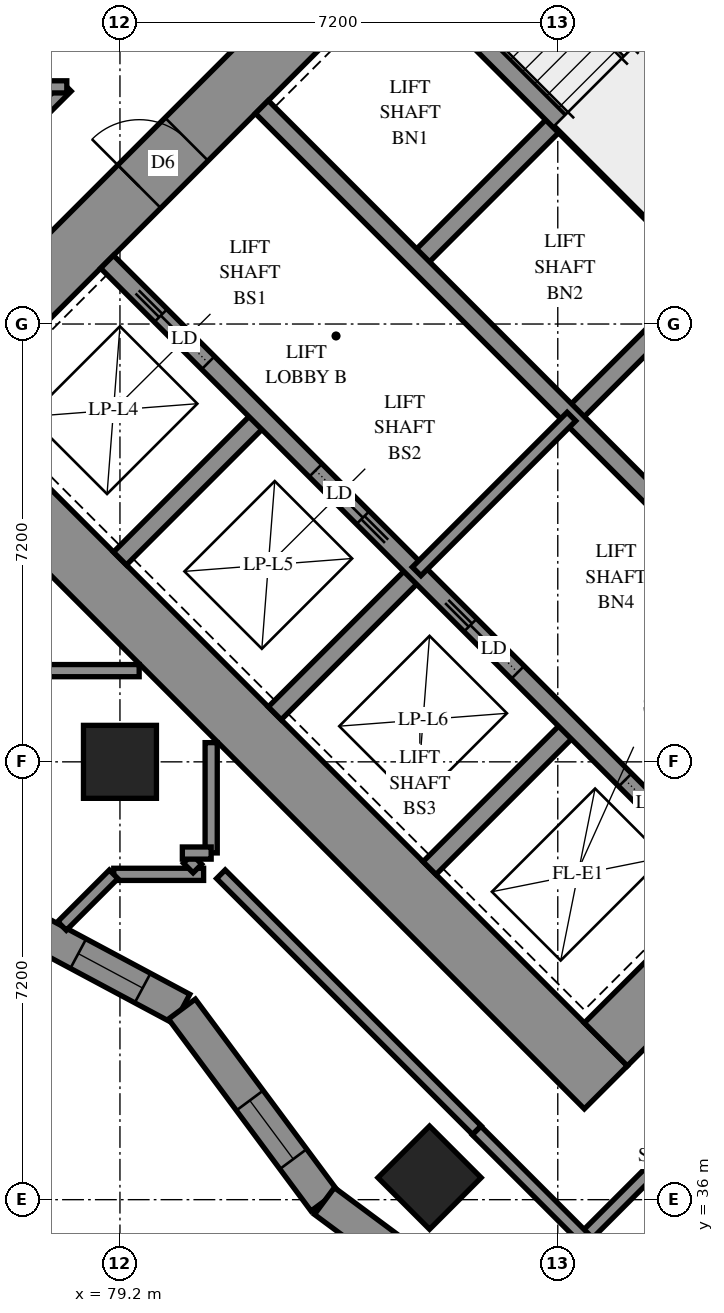
"""IFC4 building model, lengths in metres.
Left out: names, types, materials, properties, quantities, classifications, styles, units other than length and angle.
Written with IfcOpenShell. Run it as: python <this file> out.ifc"""

import sys

from ifc_helpers import new_model, si_unit, direction, frame, frame_2d, origin, origin_2d, place, context, subcontext, project, spatial, polyline, rectangle, outline, extrude, element, fill, save


model = new_model("IFC4")
c1 = context("Model", 3, precision=1e-05, world=origin(), true_north=direction((0.0, 1.0)))
c2 = subcontext(c1, "Body", "Model", "MODEL_VIEW")
j1 = project(units=[si_unit("LENGTHUNIT", "METRE"), si_unit("PLANEANGLEUNIT", "RADIAN")], contexts=[c1])
p1 = place(None, origin())
s1 = spatial("IfcSite", under=j1, at=p1, CompositionType="ELEMENT")
p2 = place(p1, origin())
s2 = spatial("IfcBuilding", under=s1, at=p2, CompositionType="ELEMENT")
p3 = place(p2, frame((0.0, 0.0, 57.6)))
s3 = spatial("IfcBuildingStorey", under=s2, at=p3, CompositionType="ELEMENT", Elevation=57.6)
for number, where, z_axis, x_axis in (
    (1, (79.2, 43.2, 0.0), (0.0, 0.0, 1.0), (1.0, 0.0, 0.0)),
    (2, (84.291, 36.362, 0.0), (0.0, 0.0, 1.0), (0.707, -0.707, 0.0)),
):
    element("IfcColumn", number, at=place(p3, frame(where, z_axis=z_axis, x_axis=x_axis)), inside=s3, PredefinedType="COLUMN", context=c2, shape_type="SweptSolid", body=[
        extrude(rectangle(XDim=1.2, YDim=1.2, at=origin_2d()), origin(), (0.0, 0.0, 1.0), 3.1),
    ])
p4 = place(p3, frame((75.594, 49.443, -0.3), z_axis=(0.0, 0.0, 1.0), x_axis=(0.7071037324, -0.70710983, 0.0)))
e3 = element("IfcWall", 3, at=p4, inside=s3, PredefinedType="SHEAR", context=c2, shape_type="SweptSolid", body=[
    extrude(rectangle(XDim=16.4, YDim=1.0, at=frame_2d((8.2, 0.0))), origin(), (0.0, 0.0, 1.0), 2.7),
])
p5 = place(p3, frame((86.483, 60.333, -0.3), z_axis=(0.0, 0.0, 1.0), x_axis=(0.70710983, -0.7071037324, 0.0)))
e4 = element("IfcWall", 4, at=p5, inside=s3, PredefinedType="SHEAR", context=c2, shape_type="SweptSolid", body=[
    extrude(rectangle(XDim=16.4, YDim=1.0, at=frame_2d((8.2, 0.0))), origin(), (0.0, 0.0, 1.0), 2.7),
])
p6 = place(p5, frame((11.0, 0.0, 0.3)))
e5 = element("IfcOpeningElement", 5, at=p6, cuts=e4, PredefinedType="OPENING", context=c2, shape_type="SweptSolid", body=[
    extrude(rectangle(XDim=0.8, YDim=2.1, at=frame_2d((0.4, 1.05))), frame((0.0, 0.51, 0.0), z_axis=(0.0, -1.0, 0.0), x_axis=(1.0, 0.0, 0.0)), (0.0, 0.0, 1.0), 1.02),
])
p7 = place(p3, frame((76.301, 49.443, -0.3), z_axis=(0.0, 0.0, 1.0), x_axis=(0.7071067812, 0.7071067812, 0.0)))
e6 = element("IfcWall", 6, at=p7, inside=s3, PredefinedType="SHEAR", context=c2, shape_type="SweptSolid", body=[
    extrude(rectangle(XDim=14.4, YDim=1.0, at=frame_2d((7.2, 0.0))), origin(), (0.0, 0.0, 1.0), 2.7),
])
p8 = place(p7, frame((4.55, 0.0, 0.3)))
e7 = element("IfcOpeningElement", 7, at=p8, cuts=e6, PredefinedType="OPENING", context=c2, shape_type="SweptSolid", body=[
    extrude(rectangle(XDim=1.1, YDim=2.1, at=frame_2d((0.55, 1.05))), frame((0.0, 0.51, 0.0), z_axis=(0.0, -1.0, 0.0), x_axis=(1.0, 0.0, 0.0)), (0.0, 0.0, 1.0), 1.02),
])
p9 = place(p7, frame((11.35, 0.0, 0.3)))
e8 = element("IfcOpeningElement", 8, at=p9, cuts=e6, PredefinedType="OPENING", context=c2, shape_type="SweptSolid", body=[
    extrude(rectangle(XDim=1.1, YDim=2.1, at=frame_2d((0.55, 1.05))), frame((0.0, 0.51, 0.0), z_axis=(0.0, -1.0, 0.0), x_axis=(1.0, 0.0, 0.0)), (0.0, 0.0, 1.0), 1.02),
])
p10 = place(p3, frame((87.19, 38.554, -0.3), z_axis=(0.0, 0.0, 1.0), x_axis=(0.707103309, 0.7071102534, 0.0)))
e9 = element("IfcWall", 9, at=p10, inside=s3, PredefinedType="SHEAR", context=c2, shape_type="SweptSolid", body=[
    extrude(rectangle(XDim=14.4, YDim=1.0, at=frame_2d((7.2, 0.0))), origin(), (0.0, 0.0, 1.0), 2.7),
])
p11 = place(p10, frame((4.55, 0.0, 0.3)))
e10 = element("IfcOpeningElement", 10, at=p11, cuts=e9, PredefinedType="OPENING", context=c2, shape_type="SweptSolid", body=[
    extrude(rectangle(XDim=1.1, YDim=2.1, at=frame_2d((0.55, 1.05))), frame((0.0, 0.51, 0.0), z_axis=(0.0, -1.0, 0.0), x_axis=(1.0, 0.0, 0.0)), (0.0, 0.0, 1.0), 1.02),
])
p12 = place(p10, frame((11.35, 0.0, 0.3)))
e11 = element("IfcOpeningElement", 11, at=p12, cuts=e9, PredefinedType="OPENING", context=c2, shape_type="SweptSolid", body=[
    extrude(rectangle(XDim=1.1, YDim=2.1, at=frame_2d((0.55, 1.05))), frame((0.0, 0.51, 0.0), z_axis=(0.0, -1.0, 0.0), x_axis=(1.0, 0.0, 0.0)), (0.0, 0.0, 1.0), 1.02),
])
for number, where, z_axis, x_axis in (
    (12, (79.2, 46.544, 0.0), (0.0, 0.0, 1.0), (0.707, 0.707, 0.0)),
    (13, (84.079, 51.423, 0.0), (0.0, 0.0, 1.0), (0.707, 0.707, 0.0)),
):
    element("IfcWall", number, at=place(p3, frame(where, z_axis=z_axis, x_axis=x_axis)), inside=s3, PredefinedType="SOLIDWALL", context=c2, shape_type="SweptSolid", body=[
        extrude(rectangle(XDim=3.3, YDim=0.3, at=frame_2d((1.65, 0.0))), origin(), (0.0, 0.0, 1.0), 3.1),
    ])
p13 = place(p3, frame((81.746, 43.999, 0.0), z_axis=(0.0, 0.0, 1.0), x_axis=(0.7071067812, 0.7071067812, 0.0)))
e14 = element("IfcWall", 14, at=p13, inside=s3, PredefinedType="SOLIDWALL", context=c2, shape_type="SweptSolid", body=[
    extrude(rectangle(XDim=3.3, YDim=0.3, at=frame_2d((1.65, 0.0))), origin(), (0.0, 0.0, 1.0), 3.1),
])
p14 = place(p3, frame((86.625, 48.878, 0.0), z_axis=(0.0, 0.0, 1.0), x_axis=(0.7071067812, 0.7071067812, 0.0)))
e15 = element("IfcWall", 15, at=p14, inside=s3, PredefinedType="SOLIDWALL", context=c2, shape_type="SweptSolid", body=[
    extrude(rectangle(XDim=3.3, YDim=0.3, at=frame_2d((1.65, 0.0))), origin(), (0.0, 0.0, 1.0), 3.1),
])
p15 = place(p3, frame((84.291, 41.453, 0.0), z_axis=(0.0, 0.0, 1.0), x_axis=(0.7071067812, 0.7071067812, 0.0)))
e16 = element("IfcWall", 16, at=p15, inside=s3, PredefinedType="SOLIDWALL", context=c2, shape_type="SweptSolid", body=[
    extrude(rectangle(XDim=3.3, YDim=0.3, at=frame_2d((1.65, 0.0))), origin(), (0.0, 0.0, 1.0), 3.1),
])
p16 = place(p3, frame((78.988, 51.423, 0.0), z_axis=(0.0, 0.0, 1.0), x_axis=(0.7071067812, -0.7071067812, 0.0)))
e17 = element("IfcWall", 17, at=p16, inside=s3, PredefinedType="SOLIDWALL", context=c2, shape_type="SweptSolid", body=[
    extrude(rectangle(XDim=14.4, YDim=0.3, at=frame_2d((7.2, 0.0))), origin(), (0.0, 0.0, 1.0), 3.1),
])
p17 = place(p16, frame((1.25, 0.0, 0.0)))
e18 = element("IfcOpeningElement", 18, at=p17, cuts=e17, PredefinedType="OPENING", context=c2, shape_type="SweptSolid", body=[
    extrude(rectangle(XDim=1.1, YDim=2.1, at=frame_2d((0.55, 1.05))), frame((0.0, 0.16, 0.0), z_axis=(0.0, -1.0, 0.0), x_axis=(1.0, 0.0, 0.0)), (0.0, 0.0, 1.0), 0.32),
])
p18 = place(p16, frame((4.85, 0.0, 0.0)))
e19 = element("IfcOpeningElement", 19, at=p18, cuts=e17, PredefinedType="OPENING", context=c2, shape_type="SweptSolid", body=[
    extrude(rectangle(XDim=1.1, YDim=2.1, at=frame_2d((0.55, 1.05))), frame((0.0, 0.16, 0.0), z_axis=(0.0, -1.0, 0.0), x_axis=(1.0, 0.0, 0.0)), (0.0, 0.0, 1.0), 0.32),
])
p19 = place(p16, frame((8.45, 0.0, 0.0)))
e20 = element("IfcOpeningElement", 20, at=p19, cuts=e17, PredefinedType="OPENING", context=c2, shape_type="SweptSolid", body=[
    extrude(rectangle(XDim=1.1, YDim=2.1, at=frame_2d((0.55, 1.05))), frame((0.0, 0.16, 0.0), z_axis=(0.0, -1.0, 0.0), x_axis=(1.0, 0.0, 0.0)), (0.0, 0.0, 1.0), 0.32),
])
p20 = place(p16, frame((12.05, 0.0, 0.0)))
e21 = element("IfcOpeningElement", 21, at=p20, cuts=e17, PredefinedType="OPENING", context=c2, shape_type="SweptSolid", body=[
    extrude(rectangle(XDim=1.1, YDim=2.1, at=frame_2d((0.55, 1.05))), frame((0.0, 0.16, 0.0), z_axis=(0.0, -1.0, 0.0), x_axis=(1.0, 0.0, 0.0)), (0.0, 0.0, 1.0), 0.32),
])
p21 = place(p3, frame((81.534, 53.969, 0.0), z_axis=(0.0, 0.0, 1.0), x_axis=(0.707103309, -0.7071102534, 0.0)))
e22 = element("IfcWall", 22, at=p21, inside=s3, PredefinedType="SOLIDWALL", context=c2, shape_type="SweptSolid", body=[
    extrude(rectangle(XDim=14.4, YDim=0.3, at=frame_2d((7.2, 0.0))), origin(), (0.0, 0.0, 1.0), 3.1),
])
p22 = place(p21, frame((12.05, 0.0, 0.0)))
e23 = element("IfcOpeningElement", 23, at=p22, cuts=e22, PredefinedType="OPENING", context=c2, shape_type="SweptSolid", body=[
    extrude(rectangle(XDim=1.1, YDim=2.1, at=frame_2d((0.55, 1.05))), frame((0.0, 0.16, 0.0), z_axis=(0.0, -1.0, 0.0), x_axis=(1.0, 0.0, 0.0)), (0.0, 0.0, 1.0), 0.32),
])
p23 = place(p3, frame((83.867, 56.302, 0.0), z_axis=(0.0, 0.0, 1.0), x_axis=(0.7071137256, -0.7070998367, 0.0)))
e24 = element("IfcWall", 24, at=p23, inside=s3, PredefinedType="SOLIDWALL", context=c2, shape_type="SweptSolid", body=[
    extrude(rectangle(XDim=7.2, YDim=0.3, at=frame_2d((3.6, 0.0))), origin(), (0.0, 0.0, 1.0), 3.1),
])
p24 = place(p3, frame((76.581, 41.081, 0.0), z_axis=(0.0, 0.0, 1.0), x_axis=(0.8817457272, -0.4717249968, 0.0)))
e25 = element("IfcWall", 25, at=p24, inside=s3, PredefinedType="SOLIDWALL", context=c2, shape_type="SweptSolid", body=[
    extrude(outline(polyline([(0.022, -0.275), (4.064, -0.275), (4.188, 0.275), (-0.022, 0.275), (0.022, -0.275)])), origin(), (0.0, 0.0, 1.0), 3.1),
])
p25 = place(p24, frame((0.33, 0.0, 0.5)))
e26 = element("IfcOpeningElement", 26, at=p25, cuts=e25, PredefinedType="OPENING", context=c2, shape_type="SweptSolid", body=[
    extrude(rectangle(XDim=1.2, YDim=2.45, at=frame_2d((0.6, 1.225))), frame((0.0, 0.285, 0.0), z_axis=(0.0, -1.0, 0.0), x_axis=(1.0, 0.0, 0.0)), (0.0, 0.0, 1.0), 0.57),
])
p26 = place(p24, frame((2.193, 0.0, 0.5)))
e27 = element("IfcOpeningElement", 27, at=p26, cuts=e25, PredefinedType="OPENING", context=c2, shape_type="SweptSolid", body=[
    extrude(rectangle(XDim=1.2, YDim=2.45, at=frame_2d((0.6, 1.225))), frame((0.0, 0.285, 0.0), z_axis=(0.0, -1.0, 0.0), x_axis=(1.0, 0.0, 0.0)), (0.0, 0.0, 1.0), 0.57),
])
p27 = place(p3, frame((80.219, 39.135, 0.0), z_axis=(0.0, 0.0, 1.0), x_axis=(0.5960781369, -0.8029264317, 0.0)))
e28 = element("IfcWall", 28, at=p27, inside=s3, PredefinedType="SOLIDWALL", context=c2, shape_type="SweptSolid", body=[
    extrude(outline(polyline([(0.062, -0.275), (3.973, -0.275), (3.891, 0.275), (-0.062, 0.275), (0.062, -0.275)])), origin(), (0.0, 0.0, 1.0), 3.1),
])
p28 = place(p27, frame((1.872, 0.0, 0.5)))
e29 = element("IfcOpeningElement", 29, at=p28, cuts=e28, PredefinedType="OPENING", context=c2, shape_type="SweptSolid", body=[
    extrude(rectangle(XDim=1.2, YDim=2.45, at=frame_2d((0.6, 1.225))), frame((0.0, 0.285, 0.0), z_axis=(0.0, -1.0, 0.0), x_axis=(1.0, 0.0, 0.0)), (0.0, 0.0, 1.0), 0.57),
])
p29 = place(p3, frame((82.563, 35.977, 0.0), z_axis=(0.0, 0.0, 1.0), x_axis=(0.8029207709, -0.596085762, 0.0)))
e30 = element("IfcWall", 30, at=p29, inside=s3, PredefinedType="SOLIDWALL", context=c2, shape_type="SweptSolid", body=[
    extrude(outline(polyline([(-0.041, -0.275), (3.87, -0.275), (3.951, 0.275), (0.041, 0.275), (-0.041, -0.275)])), origin(), (0.0, 0.0, 1.0), 3.1),
])
p30 = place(p29, frame((1.736, 0.0, 0.5)))
e31 = element("IfcOpeningElement", 31, at=p30, cuts=e30, PredefinedType="OPENING", context=c2, shape_type="SweptSolid", body=[
    extrude(rectangle(XDim=1.2, YDim=2.45, at=frame_2d((0.6, 1.225))), frame((0.0, 0.285, 0.0), z_axis=(0.0, -1.0, 0.0), x_axis=(1.0, 0.0, 0.0)), (0.0, 0.0, 1.0), 0.57),
])
p31 = place(p3, frame((84.079, 46.332, 0.0), z_axis=(0.0, 0.0, 1.0), x_axis=(0.7071067812, 0.7071067812, 0.0)))
e32 = element("IfcWall", 32, at=p31, inside=s3, PredefinedType="PARTITIONING", context=c2, shape_type="SweptSolid", body=[
    extrude(rectangle(XDim=3.6, YDim=0.2, at=frame_2d((1.8, 0.0))), origin(), (0.0, 0.0, 1.0), 3.1),
])
p32 = place(p3, frame((86.833, 62.805, 0.0), z_axis=(0.0, 0.0, 1.0), x_axis=(0.7072045138, -0.7070090351, 0.0)))
e33 = element("IfcWall", 33, at=p32, inside=s3, PredefinedType="PARTITIONING", context=c2, shape_type="SweptSolid", body=[
    extrude(rectangle(XDim=13.301, YDim=0.2, at=frame_2d((6.65, 0.0))), origin(), (0.0, 0.0, 1.0), 3.1),
])
p33 = place(p32, frame((10.586, 0.0, 0.0)))
e34 = element("IfcOpeningElement", 34, at=p33, cuts=e33, PredefinedType="OPENING", context=c2, shape_type="SweptSolid", body=[
    extrude(rectangle(XDim=1.0, YDim=2.1, at=frame_2d((0.5, 1.05))), frame((0.0, 0.11, 0.0), z_axis=(0.0, -1.0, 0.0), x_axis=(1.0, 0.0, 0.0)), (0.0, 0.0, 1.0), 0.22),
])
p34 = place(p3, frame((86.314, 33.285, 0.0), z_axis=(0.0, 0.0, 1.0), x_axis=(0.7069956063, 0.7072179386, 0.0)))
e35 = element("IfcWall", 35, at=p34, inside=s3, PredefinedType="PARTITIONING", context=c2, shape_type="SweptSolid", body=[
    extrude(rectangle(XDim=9.445, YDim=0.2, at=frame_2d((4.723, 0.0))), origin(), (0.0, 0.0, 1.0), 3.1),
])
p35 = place(p3, frame((86.836, 35.372, 0.0), z_axis=(0.0, 0.0, 1.0), x_axis=(0.7071067812, 0.7071067812, 0.0)))
e36 = element("IfcWall", 36, at=p35, inside=s3, PredefinedType="PARTITIONING", context=c2, shape_type="SweptSolid", body=[
    extrude(rectangle(XDim=7.6, YDim=0.2, at=frame_2d((3.8, 0.0))), origin(), (0.0, 0.0, 1.0), 3.1),
])
p36 = place(p35, frame((6.342, 0.0, 0.0)))
e37 = element("IfcOpeningElement", 37, at=p36, cuts=e36, PredefinedType="OPENING", context=c2, shape_type="SweptSolid", body=[
    extrude(rectangle(XDim=1.0, YDim=2.1, at=frame_2d((0.5, 1.05))), frame((0.0, 0.11, 0.0), z_axis=(0.0, -1.0, 0.0), x_axis=(1.0, 0.0, 0.0)), (0.0, 0.0, 1.0), 0.22),
])
p37 = place(p3, frame((85.07, 37.142, 0.0), z_axis=(0.0, 0.0, 1.0), x_axis=(-0.7070899851, 0.7071235769, 0.0)))
e38 = element("IfcWall", 38, at=p37, inside=s3, PredefinedType="PARTITIONING", context=c2, shape_type="SweptSolid", body=[
    extrude(rectangle(XDim=5.954, YDim=0.2, at=frame_2d((2.977, 0.0))), origin(), (0.0, 0.0, 1.0), 3.1),
])
p38 = place(p3, frame((74.699, 50.671, 0.0), z_axis=(0.0, 0.0, 1.0), x_axis=(0.7071067812, 0.7071067812, 0.0)))
e39 = element("IfcWall", 39, at=p38, inside=s3, PredefinedType="PARTITIONING", context=c2, shape_type="SweptSolid", body=[
    extrude(rectangle(XDim=5.131, YDim=0.2, at=frame_2d((2.565, 0.0))), origin(), (0.0, 0.0, 1.0), 3.1),
])
p39 = place(p3, frame((74.502, 54.3, 0.0), z_axis=(0.0, 0.0, 1.0), x_axis=(1.0, 0.0, 0.0)))
e40 = element("IfcWall", 40, at=p39, inside=s3, PredefinedType="PARTITIONING", context=c2, shape_type="SweptSolid", body=[
    extrude(rectangle(XDim=3.824, YDim=0.2, at=frame_2d((1.912, 0.0))), origin(), (0.0, 0.0, 1.0), 3.1),
])
p40 = place(p39, frame((0.55, 0.0, 0.0)))
e41 = element("IfcOpeningElement", 41, at=p40, cuts=e40, PredefinedType="OPENING", context=c2, shape_type="SweptSolid", body=[
    extrude(rectangle(XDim=1.0, YDim=2.1, at=frame_2d((0.5, 1.05))), frame((0.0, 0.11, 0.0), z_axis=(0.0, -1.0, 0.0), x_axis=(1.0, 0.0, 0.0)), (0.0, 0.0, 1.0), 0.22),
])
p41 = place(p3, frame((85.065, 37.137, 0.0), z_axis=(0.0, 0.0, 1.0), x_axis=(0.7071067812, -0.7071067812, 0.0)))
e42 = element("IfcWall", 42, at=p41, inside=s3, PredefinedType="PARTITIONING", context=c2, shape_type="SweptSolid", body=[
    extrude(rectangle(XDim=2.5, YDim=0.2, at=frame_2d((1.25, 0.0))), origin(), (0.0, 0.0, 1.0), 3.1),
])
for number, where, z_axis, x_axis in (
    (43, (77.702, 44.7, 0.0), (0.0, 0.0, 1.0), (1.0, 0.0, 0.0)),
    (44, (80.7, 41.702, 0.0), (0.0, 0.0, 1.0), (0.0, 1.0, 0.0)),
):
    element("IfcWall", number, at=place(p3, frame(where, z_axis=z_axis, x_axis=x_axis)), inside=s3, PredefinedType="PARTITIONING", context=c2, shape_type="SweptSolid", body=[
        extrude(rectangle(XDim=1.814, YDim=0.2, at=frame_2d((0.907, 0.0))), origin(), (0.0, 0.0, 1.0), 3.1),
    ])
p42 = place(p3, frame((79.098, 41.35, 0.0), z_axis=(0.0, 0.0, 1.0), x_axis=(1.0, 0.0, 0.0)))
e45 = element("IfcWall", 45, at=p42, inside=s3, PredefinedType="PARTITIONING", context=c2, shape_type="SweptSolid", body=[
    extrude(rectangle(XDim=1.478, YDim=0.2, at=frame_2d((0.739, 0.0))), origin(), (0.0, 0.0, 1.0), 3.1),
])
p43 = place(p3, frame((78.247, 40.501, 0.0), z_axis=(0.0, 0.0, 1.0), x_axis=(0.7071067812, 0.7071067812, 0.0)))
e46 = element("IfcWall", 46, at=p43, inside=s3, PredefinedType="PARTITIONING", context=c2, shape_type="SweptSolid", body=[
    extrude(rectangle(XDim=1.2, YDim=0.2, at=frame_2d((0.6, 0.0))), origin(), (0.0, 0.0, 1.0), 3.1),
])
p44 = place(p3, frame((80.315, 41.605, 0.0), z_axis=(0.0, 0.0, 1.0), x_axis=(0.7071067812, -0.7071067812, 0.0)))
e47 = element("IfcWall", 47, at=p44, inside=s3, PredefinedType="PARTITIONING", context=c2, shape_type="SweptSolid", body=[
    extrude(rectangle(XDim=0.225, YDim=0.2, at=frame_2d((0.113, 0.0))), origin(), (0.0, 0.0, 1.0), 3.1),
])
p45 = place(p3, frame((80.226, 41.7, 0.0), z_axis=(0.0, 0.0, 1.0), x_axis=(1.0, 0.0, 0.0)))
e48 = element("IfcWall", 48, at=p45, inside=s3, PredefinedType="PARTITIONING", context=c2, shape_type="SweptSolid", body=[
    extrude(rectangle(XDim=0.474, YDim=0.2, at=frame_2d((0.237, 0.0))), origin(), (0.0, 0.0, 1.0), 3.1),
])
p46 = place(p26, origin())
e49 = element("IfcWindow", 49, at=p46, inside=s3, PartitioningType="SINGLE_PANEL", PredefinedType="WINDOW", context=c2, shape_type="SweptSolid", body=[
    extrude(rectangle(XDim=1.2, YDim=2.45, at=frame_2d((0.6, 1.225))), frame((0.0, 0.155, 0.0), z_axis=(0.0, -1.0, 0.0), x_axis=(1.0, 0.0, 0.0)), (0.0, 0.0, 1.0), 0.06),
])
fill(e27, e49)
p47 = place(p28, origin())
e50 = element("IfcWindow", 50, at=p47, inside=s3, PartitioningType="SINGLE_PANEL", PredefinedType="WINDOW", context=c2, shape_type="SweptSolid", body=[
    extrude(rectangle(XDim=1.2, YDim=2.45, at=frame_2d((0.6, 1.225))), frame((0.0, 0.155, 0.0), z_axis=(0.0, -1.0, 0.0), x_axis=(1.0, 0.0, 0.0)), (0.0, 0.0, 1.0), 0.06),
])
fill(e29, e50)
p48 = place(p8, origin())
e51 = element("IfcDoor", 51, at=p48, inside=s3, OperationType="DOUBLE_DOOR_SINGLE_SWING", PredefinedType="DOOR", context=c2, shape_type="SweptSolid", body=[
    extrude(rectangle(XDim=1.1, YDim=2.1, at=frame_2d((0.55, 1.05))), frame((0.0, 0.025, 0.0), z_axis=(0.0, -1.0, 0.0), x_axis=(1.0, 0.0, 0.0)), (0.0, 0.0, 1.0), 0.05),
])
fill(e7, e51)
p49 = place(p17, origin())
e52 = element("IfcDoor", 52, at=p49, inside=s3, OperationType="SLIDING_TO_LEFT", PredefinedType="DOOR", context=c2, shape_type="SweptSolid", body=[
    extrude(rectangle(XDim=1.1, YDim=2.1, at=frame_2d((0.55, 1.05))), frame((0.0, 0.025, 0.0), z_axis=(0.0, -1.0, 0.0), x_axis=(1.0, 0.0, 0.0)), (0.0, 0.0, 1.0), 0.05),
])
fill(e18, e52)
p50 = place(p18, origin())
e53 = element("IfcDoor", 53, at=p50, inside=s3, OperationType="SLIDING_TO_RIGHT", PredefinedType="DOOR", context=c2, shape_type="SweptSolid", body=[
    extrude(rectangle(XDim=1.1, YDim=2.1, at=frame_2d((0.55, 1.05))), frame((0.0, 0.025, 0.0), z_axis=(0.0, -1.0, 0.0), x_axis=(1.0, 0.0, 0.0)), (0.0, 0.0, 1.0), 0.05),
])
fill(e19, e53)
p51 = place(p19, origin())
e54 = element("IfcDoor", 54, at=p51, inside=s3, OperationType="SLIDING_TO_LEFT", PredefinedType="DOOR", context=c2, shape_type="SweptSolid", body=[
    extrude(rectangle(XDim=1.1, YDim=2.1, at=frame_2d((0.55, 1.05))), frame((0.0, 0.025, 0.0), z_axis=(0.0, -1.0, 0.0), x_axis=(1.0, 0.0, 0.0)), (0.0, 0.0, 1.0), 0.05),
])
fill(e20, e54)
p52 = place(p20, origin())
e55 = element("IfcDoor", 55, at=p52, inside=s3, OperationType="SLIDING_TO_RIGHT", PredefinedType="DOOR", context=c2, shape_type="SweptSolid", body=[
    extrude(rectangle(XDim=1.1, YDim=2.1, at=frame_2d((0.55, 1.05))), frame((0.0, 0.025, 0.0), z_axis=(0.0, -1.0, 0.0), x_axis=(1.0, 0.0, 0.0)), (0.0, 0.0, 1.0), 0.05),
])
fill(e21, e55)
save(model, sys.argv[1])
